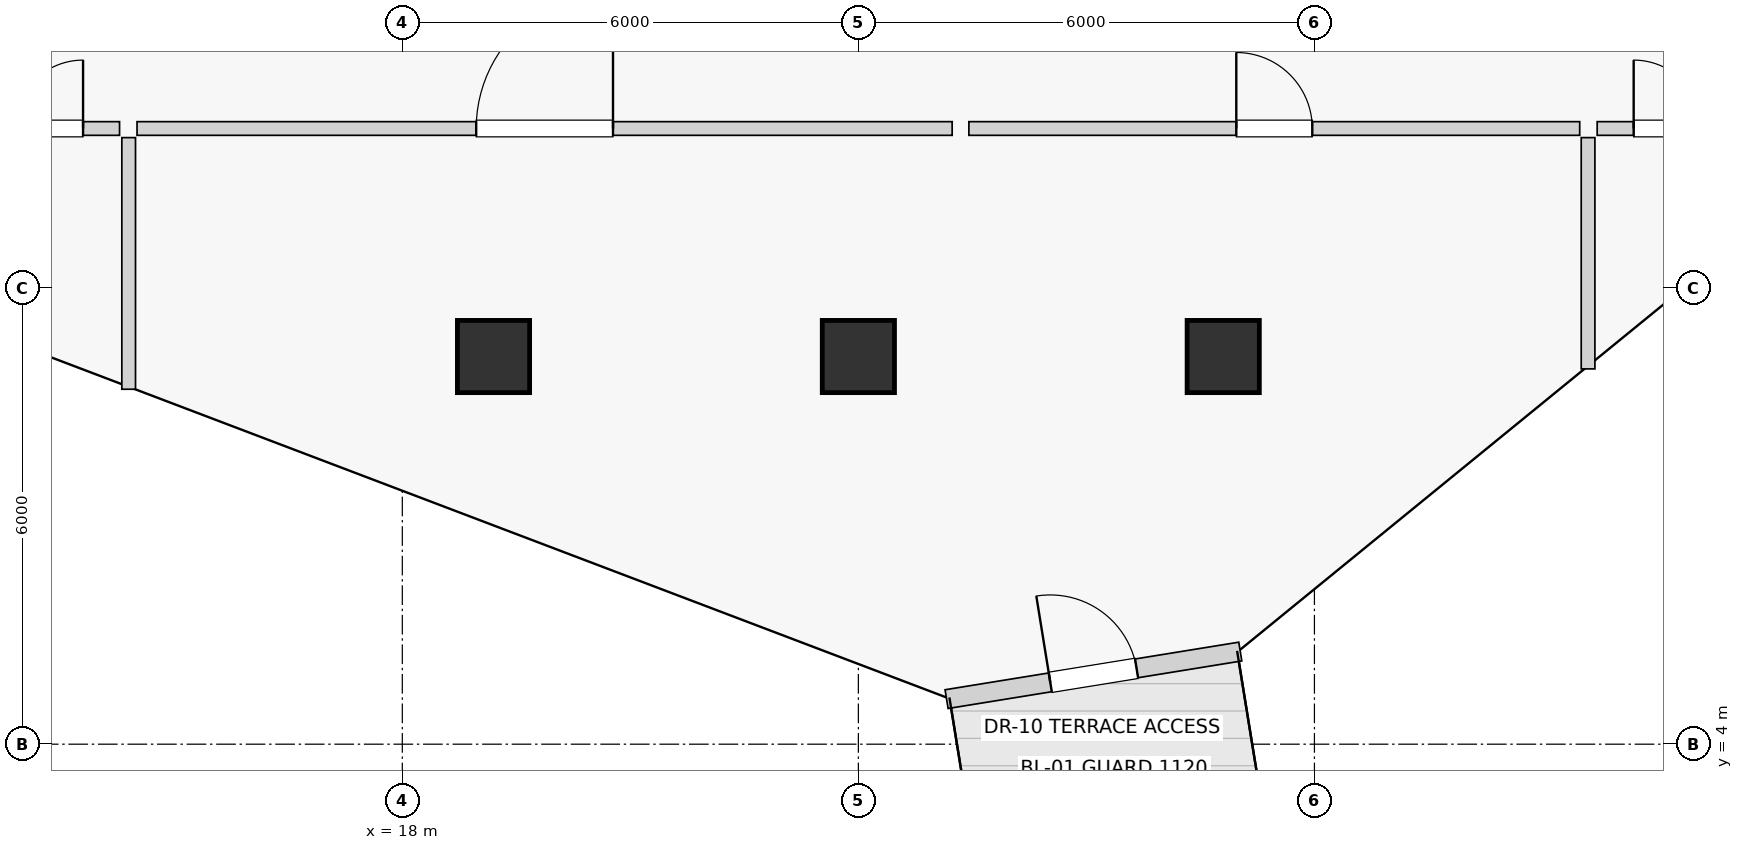
"""IFC4 building model, lengths in metres.
Left out: names, types, materials, properties, quantities, classifications, styles, units other than length and angle.
Written with IfcOpenShell. Run it as: python <this file> out.ifc"""

import sys

from ifc_helpers import new_model, si_unit, direction, frame, frame_2d, origin, origin_2d, place, context, subcontext, project, spatial, rectangle, extrude, source, transform, mapped, element, fill, save


model = new_model("IFC4")
c1 = context("Model", 3, precision=1e-05, world=origin(), true_north=direction((0.0, 1.0)))
c2 = subcontext(c1, "Body", "Model", "MODEL_VIEW")
j1 = project(units=[si_unit("LENGTHUNIT", "METRE"), si_unit("PLANEANGLEUNIT", "RADIAN")], contexts=[c1])
p1 = place(None, origin())
s1 = spatial("IfcSite", under=j1, at=p1, CompositionType="ELEMENT")
p2 = place(p1, origin())
s2 = spatial("IfcBuilding", under=s1, at=p2, CompositionType="ELEMENT")
p3 = place(p2, frame((0.0, 0.0, 174.35)))
s3 = spatial("IfcBuildingStorey", under=s2, at=p3, CompositionType="ELEMENT", Elevation=174.35)
for number, where, z_axis, x_axis in (
    (1, (19.2, 9.1, -0.32), (0.0, 0.0, 1.0), (1.0, 0.0, 0.0)),
    (2, (24.0, 9.1, -0.32), (0.0, 0.0, 1.0), (1.0, 0.0, 0.0)),
    (3, (28.8, 9.1, -0.32), (0.0, 0.0, 1.0), (1.0, 0.0, 0.0)),
):
    element("IfcColumn", number, at=place(p3, frame(where, z_axis=z_axis, x_axis=x_axis)), inside=s3, PredefinedType="COLUMN", context=c2, shape_type="SweptSolid", body=[
        extrude(rectangle(XDim=0.95, YDim=0.95, at=origin_2d()), origin(), (0.0, 0.0, 1.0), 4.82),
    ])
p4 = place(p3, frame((25.161, 4.593, 0.0), z_axis=(0.0, 0.0, 1.0), x_axis=(0.98714034635, 0.159855987091, 0.0)))
e4 = element("IfcWall", 4, at=p4, inside=s3, PredefinedType="SOLIDWALL", context=c2, shape_type="SweptSolid", body=[
    extrude(rectangle(XDim=3.914, YDim=0.25, at=frame_2d((1.957, 0.0))), origin(), (0.0, 0.0, 1.0), 4.265),
])
p5 = place(p4, frame((1.382, 0.0, 0.0)))
e5 = element("IfcOpeningElement", 5, at=p5, cuts=e4, PredefinedType="OPENING", context=c2, shape_type="SweptSolid", body=[
    extrude(rectangle(XDim=1.15, YDim=2.25, at=frame_2d((0.575, 1.125))), frame((0.0, 0.135, 0.0), z_axis=(0.0, -1.0, 0.0), x_axis=(1.0, 0.0, 0.0)), (0.0, 0.0, 1.0), 0.27),
])
p6 = place(p3, frame((14.4, 11.98, 0.0), z_axis=(0.0, 0.0, 1.0), x_axis=(0.0, -1.0, 0.0)))
e6 = element("IfcWall", 6, at=p6, inside=s3, PredefinedType="PARTITIONING", context=c2, shape_type="SweptSolid", body=[
    extrude(rectangle(XDim=3.31, YDim=0.18, at=frame_2d((1.655, 0.0))), origin(), (0.0, 0.0, 1.0), 4.265),
])
p7 = place(p3, frame((33.6, 11.98, 0.0), z_axis=(0.0, 0.0, 1.0), x_axis=(0.0, -1.0, 0.0)))
e7 = element("IfcWall", 7, at=p7, inside=s3, PredefinedType="PARTITIONING", context=c2, shape_type="SweptSolid", body=[
    extrude(rectangle(XDim=3.043, YDim=0.18, at=frame_2d((1.521, 0.0))), origin(), (0.0, 0.0, 1.0), 4.265),
])
p8 = place(p3, frame((14.51, 12.1, 0.0), z_axis=(0.0, 0.0, 1.0), x_axis=(1.0, 0.0, 0.0)))
e8 = element("IfcWall", 8, at=p8, inside=s3, PredefinedType="PARTITIONING", context=c2, shape_type="SweptSolid", body=[
    extrude(rectangle(XDim=10.724, YDim=0.18, at=frame_2d((5.362, 0.0))), origin(), (0.0, 0.0, 1.0), 4.265),
])
p9 = place(p8, frame((4.462, 0.0, 0.0)))
e9 = element("IfcOpeningElement", 9, at=p9, cuts=e8, PredefinedType="OPENING", context=c2, shape_type="SweptSolid", body=[
    extrude(rectangle(XDim=1.8, YDim=2.25, at=frame_2d((0.9, 1.125))), frame((0.0, 0.1, 0.0), z_axis=(0.0, -1.0, 0.0), x_axis=(1.0, 0.0, 0.0)), (0.0, 0.0, 1.0), 0.2),
])
p10 = place(p3, frame((25.454, 12.1, 0.0), z_axis=(0.0, 0.0, 1.0), x_axis=(1.0, 0.0, 0.0)))
e10 = element("IfcWall", 10, at=p10, inside=s3, PredefinedType="PARTITIONING", context=c2, shape_type="SweptSolid", body=[
    extrude(rectangle(XDim=8.036, YDim=0.18, at=frame_2d((4.018, 0.0))), origin(), (0.0, 0.0, 1.0), 4.265),
])
p11 = place(p10, frame((3.518, 0.0, 0.0)))
e11 = element("IfcOpeningElement", 11, at=p11, cuts=e10, PredefinedType="OPENING", context=c2, shape_type="SweptSolid", body=[
    extrude(rectangle(XDim=1.0, YDim=2.01, at=frame_2d((0.5, 1.005))), frame((0.0, 0.1, 0.0), z_axis=(0.0, -1.0, 0.0), x_axis=(1.0, 0.0, 0.0)), (0.0, 0.0, 1.0), 0.2),
])
p12 = place(p3, frame((12.42, 12.1, 0.0), z_axis=(0.0, 0.0, 1.0), x_axis=(1.0, 0.0, 0.0)))
e12 = element("IfcWall", 12, at=p12, inside=s3, PredefinedType="PARTITIONING", context=c2, shape_type="SweptSolid", body=[
    extrude(rectangle(XDim=1.86, YDim=0.18, at=frame_2d((0.93, 0.0))), origin(), (0.0, 0.0, 1.0), 4.265),
])
p13 = place(p12, frame((0.48, 0.0, 0.0)))
e13 = element("IfcOpeningElement", 13, at=p13, cuts=e12, PredefinedType="OPENING", context=c2, shape_type="SweptSolid", body=[
    extrude(rectangle(XDim=0.9, YDim=2.01, at=frame_2d((0.45, 1.005))), frame((0.0, 0.1, 0.0), z_axis=(0.0, -1.0, 0.0), x_axis=(1.0, 0.0, 0.0)), (0.0, 0.0, 1.0), 0.2),
])
p14 = place(p3, frame((33.72, 12.1, 0.0), z_axis=(0.0, 0.0, 1.0), x_axis=(1.0, 0.0, 0.0)))
e14 = element("IfcWall", 14, at=p14, inside=s3, PredefinedType="PARTITIONING", context=c2, shape_type="SweptSolid", body=[
    extrude(rectangle(XDim=1.86, YDim=0.18, at=frame_2d((0.93, 0.0))), origin(), (0.0, 0.0, 1.0), 4.265),
])
p15 = place(p14, frame((0.48, 0.0, 0.0)))
e15 = element("IfcOpeningElement", 15, at=p15, cuts=e14, PredefinedType="OPENING", context=c2, shape_type="SweptSolid", body=[
    extrude(rectangle(XDim=0.9, YDim=2.01, at=frame_2d((0.45, 1.005))), frame((0.0, 0.1, 0.0), z_axis=(0.0, -1.0, 0.0), x_axis=(1.0, 0.0, 0.0)), (0.0, 0.0, 1.0), 0.2),
])
m1 = source(origin(), c2, "Body", "SweptSolid", [
    extrude(rectangle(XDim=1.15, YDim=2.25, at=frame_2d((0.575, 1.125))), frame((0.0, 0.025, 0.0), z_axis=(0.0, -1.0, 0.0), x_axis=(1.0, 0.0, 0.0)), (0.0, 0.0, 1.0), 0.05),
])
p16 = place(p5, frame((1.15, 0.0, 0.0), z_axis=(0.0, 0.0, 1.0), x_axis=(-1.0, 0.0, 0.0)))
e16 = element("IfcDoor", 16, at=p16, inside=s3, OperationType="SINGLE_SWING_LEFT", PredefinedType="DOOR", context=c2, shape_type="MappedRepresentation", body=[
    mapped(m1, transform((0.0, 0.0, 0.0), scale=1.0)),
])
fill(e5, e16)
m2 = source(origin(), c2, "Body", "SweptSolid", [
    extrude(rectangle(XDim=1.8, YDim=2.25, at=frame_2d((0.9, 1.125))), frame((0.0, 0.025, 0.0), z_axis=(0.0, -1.0, 0.0), x_axis=(1.0, 0.0, 0.0)), (0.0, 0.0, 1.0), 0.05),
])
p17 = place(p9, origin())
e17 = element("IfcDoor", 17, at=p17, inside=s3, OperationType="SINGLE_SWING_RIGHT", PredefinedType="DOOR", context=c2, shape_type="MappedRepresentation", body=[
    mapped(m2, transform((0.0, 0.0, 0.0), scale=1.0)),
])
fill(e9, e17)
m3 = source(origin(), c2, "Body", "SweptSolid", [
    extrude(rectangle(XDim=1.0, YDim=2.01, at=frame_2d((0.5, 1.005))), frame((0.0, 0.025, 0.0), z_axis=(0.0, -1.0, 0.0), x_axis=(1.0, 0.0, 0.0)), (0.0, 0.0, 1.0), 0.05),
])
p18 = place(p11, origin())
e18 = element("IfcDoor", 18, at=p18, inside=s3, OperationType="SINGLE_SWING_LEFT", PredefinedType="DOOR", context=c2, shape_type="MappedRepresentation", body=[
    mapped(m3, transform((0.0, 0.0, 0.0), scale=1.0)),
])
fill(e11, e18)
m4 = source(origin(), c2, "Body", "SweptSolid", [
    extrude(rectangle(XDim=0.9, YDim=2.01, at=frame_2d((0.45, 1.005))), frame((0.0, 0.025, 0.0), z_axis=(0.0, -1.0, 0.0), x_axis=(1.0, 0.0, 0.0)), (0.0, 0.0, 1.0), 0.05),
])
p19 = place(p13, origin())
e19 = element("IfcDoor", 19, at=p19, inside=s3, OperationType="SINGLE_SWING_RIGHT", PredefinedType="DOOR", context=c2, shape_type="MappedRepresentation", body=[
    mapped(m4, transform((0.0, 0.0, 0.0), scale=1.0)),
])
fill(e13, e19)
p20 = place(p15, origin())
e20 = element("IfcDoor", 20, at=p20, inside=s3, OperationType="SINGLE_SWING_LEFT", PredefinedType="DOOR", context=c2, shape_type="MappedRepresentation", body=[
    mapped(m4, transform((0.0, 0.0, 0.0), scale=1.0)),
])
fill(e15, e20)
save(model, sys.argv[1])
